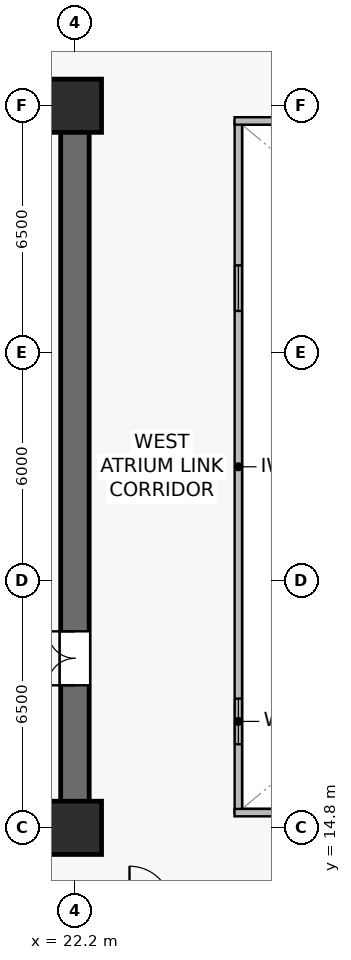
"""IFC4 building model, lengths in metres.
Left out: names, types, materials, properties, quantities, classifications, styles, units other than length and angle.
Written with IfcOpenShell. Run it as: python <this file> out.ifc"""

import sys

from ifc_helpers import new_model, si_unit, direction, frame, frame_2d, origin, origin_2d, place, context, subcontext, project, spatial, rectangle, extrude, source, transform, mapped, element, fill, save


model = new_model("IFC4")
c1 = context("Model", 3, precision=1e-05, world=origin(), true_north=direction((0.0, 1.0)))
c2 = subcontext(c1, "Body", "Model", "MODEL_VIEW")
j1 = project(units=[si_unit("LENGTHUNIT", "METRE"), si_unit("PLANEANGLEUNIT", "RADIAN")], contexts=[c1])
p1 = place(None, origin())
s1 = spatial("IfcSite", under=j1, at=p1, CompositionType="ELEMENT")
p2 = place(p1, origin())
s2 = spatial("IfcBuilding", under=s1, at=p2, CompositionType="ELEMENT")
p3 = place(p2, frame((0.0, 0.0, 62.1)))
s3 = spatial("IfcBuildingStorey", under=s2, at=p3, CompositionType="ELEMENT", Elevation=62.1)
p4 = place(p3, frame((7.025, 14.8, 0.0), z_axis=(0.0, 0.0, 1.0), x_axis=(1.0, 0.0, 0.0)))
e1 = element("IfcWall", 1, at=p4, inside=s3, PredefinedType="SHEAR", context=c2, shape_type="SweptSolid", body=[
    extrude(rectangle(XDim=15.55, YDim=0.75, at=frame_2d((7.775, 0.0))), origin(), (0.0, 0.0, 1.0), 3.78),
])
p5 = place(p3, frame((7.025, 33.8, 0.0), z_axis=(0.0, 0.0, 1.0), x_axis=(1.0, 0.0, 0.0)))
e2 = element("IfcWall", 2, at=p5, inside=s3, PredefinedType="SHEAR", context=c2, shape_type="SweptSolid", body=[
    extrude(rectangle(XDim=15.55, YDim=0.75, at=frame_2d((7.775, 0.0))), origin(), (0.0, 0.0, 1.0), 3.78),
])
p6 = place(p5, frame((5.725, 0.0, 0.0)))
e3 = element("IfcOpeningElement", 3, at=p6, cuts=e2, PredefinedType="OPENING", context=c2, shape_type="SweptSolid", body=[
    extrude(rectangle(XDim=0.95, YDim=2.15, at=frame_2d((0.475, 1.075))), frame((0.0, 0.385, 0.0), z_axis=(0.0, -1.0, 0.0), x_axis=(1.0, 0.0, 0.0)), (0.0, 0.0, 1.0), 0.77),
])
p7 = place(p5, frame((9.09, 0.0, 0.0)))
e4 = element("IfcOpeningElement", 4, at=p7, cuts=e2, PredefinedType="OPENING", context=c2, shape_type="SweptSolid", body=[
    extrude(rectangle(XDim=0.95, YDim=2.15, at=frame_2d((0.475, 1.075))), frame((0.0, 0.385, 0.0), z_axis=(0.0, -1.0, 0.0), x_axis=(1.0, 0.0, 0.0)), (0.0, 0.0, 1.0), 0.77),
])
p8 = place(p5, frame((12.49, 0.0, 0.0)))
e5 = element("IfcOpeningElement", 5, at=p8, cuts=e2, PredefinedType="OPENING", context=c2, shape_type="SweptSolid", body=[
    extrude(rectangle(XDim=0.95, YDim=2.15, at=frame_2d((0.475, 1.075))), frame((0.0, 0.385, 0.0), z_axis=(0.0, -1.0, 0.0), x_axis=(1.0, 0.0, 0.0)), (0.0, 0.0, 1.0), 0.77),
])
p9 = place(p3, frame((22.2, 15.175, 0.0), z_axis=(0.0, 0.0, 1.0), x_axis=(0.0, 1.0, 0.0)))
e6 = element("IfcWall", 6, at=p9, inside=s3, PredefinedType="SHEAR", context=c2, shape_type="SweptSolid", body=[
    extrude(rectangle(XDim=18.25, YDim=0.75, at=frame_2d((9.125, 0.0))), origin(), (0.0, 0.0, 1.0), 3.78),
])
p10 = place(p9, frame((3.375, 0.0, 0.0)))
e7 = element("IfcOpeningElement", 7, at=p10, cuts=e6, PredefinedType="OPENING", context=c2, shape_type="SweptSolid", body=[
    extrude(rectangle(XDim=1.42, YDim=2.2, at=frame_2d((0.71, 1.1))), frame((0.0, 0.385, 0.0), z_axis=(0.0, -1.0, 0.0), x_axis=(1.0, 0.0, 0.0)), (0.0, 0.0, 1.0), 0.77),
])
m1 = source(origin(), c2, "Body", "SweptSolid", [
    extrude(rectangle(XDim=1.4, YDim=1.4, at=origin_2d()), origin(), (0.0, 0.0, 1.0), 4.1),
])
for number, where, z_axis, x_axis in (
    (8, (22.2, 14.8, 0.0), (0.0, 0.0, 1.0), (1.0, 0.0, 0.0)),
    (9, (22.2, 33.8, 0.0), (0.0, 0.0, 1.0), (1.0, 0.0, 0.0)),
):
    element("IfcColumn", number, at=place(p3, frame(where, z_axis=z_axis, x_axis=x_axis)), inside=s3, PredefinedType="COLUMN", context=c2, shape_type="MappedRepresentation", body=[
        mapped(m1, transform((0.0, 0.0, 0.0), scale=1.0)),
    ])
p11 = place(p3, frame((26.5, 15.2, 0.0), z_axis=(0.0, 0.0, 1.0), x_axis=(0.0, 1.0, 0.0)))
e10 = element("IfcWall", 10, at=p11, inside=s3, PredefinedType="SOLIDWALL", context=c2, shape_type="SweptSolid", body=[
    extrude(rectangle(XDim=18.2, YDim=0.195, at=frame_2d((9.1, 0.0))), origin(), (0.0, 0.0, 1.0), 3.78),
])
p12 = place(p11, frame((1.8, 0.0, 0.9)))
e11 = element("IfcOpeningElement", 11, at=p12, cuts=e10, PredefinedType="OPENING", context=c2, shape_type="SweptSolid", body=[
    extrude(rectangle(XDim=1.2, YDim=1.35, at=frame_2d((0.6, 0.675))), frame((0.0, 0.107, 0.0), z_axis=(0.0, -1.0, 0.0), x_axis=(1.0, 0.0, 0.0)), (0.0, 0.0, 1.0), 0.215),
])
p13 = place(p11, frame((13.2, 0.0, 0.9)))
e12 = element("IfcOpeningElement", 12, at=p13, cuts=e10, PredefinedType="OPENING", context=c2, shape_type="SweptSolid", body=[
    extrude(rectangle(XDim=1.2, YDim=1.35, at=frame_2d((0.6, 0.675))), frame((0.0, 0.107, 0.0), z_axis=(0.0, -1.0, 0.0), x_axis=(1.0, 0.0, 0.0)), (0.0, 0.0, 1.0), 0.215),
])
for number, where, z_axis, x_axis in (
    (13, (26.4, 15.2, 0.0), (0.0, 0.0, 1.0), (1.0, 0.0, 0.0)),
    (14, (26.4, 33.4, 0.0), (0.0, 0.0, 1.0), (1.0, 0.0, 0.0)),
):
    element("IfcWall", number, at=place(p3, frame(where, z_axis=z_axis, x_axis=x_axis)), inside=s3, PredefinedType="SOLIDWALL", context=c2, shape_type="SweptSolid", body=[
        extrude(rectangle(XDim=22.0, YDim=0.195, at=frame_2d((11.0, 0.0))), origin(), (0.0, 0.0, 1.0), 3.78),
    ])
m2 = source(origin(), c2, "Body", "SweptSolid", [
    extrude(rectangle(XDim=1.2, YDim=1.35, at=frame_2d((0.6, 0.675))), frame((0.0, 0.03, 0.0), z_axis=(0.0, -1.0, 0.0), x_axis=(1.0, 0.0, 0.0)), (0.0, 0.0, 1.0), 0.06),
])
p14 = place(p12, origin())
e15 = element("IfcWindow", 15, at=p14, inside=s3, PartitioningType="SINGLE_PANEL", PredefinedType="WINDOW", context=c2, shape_type="MappedRepresentation", body=[
    mapped(m2, transform((0.0, 0.0, 0.0), scale=1.0)),
])
fill(e11, e15)
p15 = place(p13, origin())
e16 = element("IfcWindow", 16, at=p15, inside=s3, PartitioningType="SINGLE_PANEL", PredefinedType="WINDOW", context=c2, shape_type="MappedRepresentation", body=[
    mapped(m2, transform((0.0, 0.0, 0.0), scale=1.0)),
])
fill(e12, e16)
m3 = source(origin(), c2, "Body", "SweptSolid", [
    extrude(rectangle(XDim=1.42, YDim=2.2, at=frame_2d((0.71, 1.1))), frame((0.0, 0.025, 0.0), z_axis=(0.0, -1.0, 0.0), x_axis=(1.0, 0.0, 0.0)), (0.0, 0.0, 1.0), 0.05),
])
p16 = place(p10, origin())
e17 = element("IfcDoor", 17, at=p16, inside=s3, OperationType="DOUBLE_DOOR_SINGLE_SWING", PredefinedType="DOOR", context=c2, shape_type="MappedRepresentation", body=[
    mapped(m3, transform((0.0, 0.0, 0.0), scale=1.0)),
])
fill(e7, e17)
save(model, sys.argv[1])
